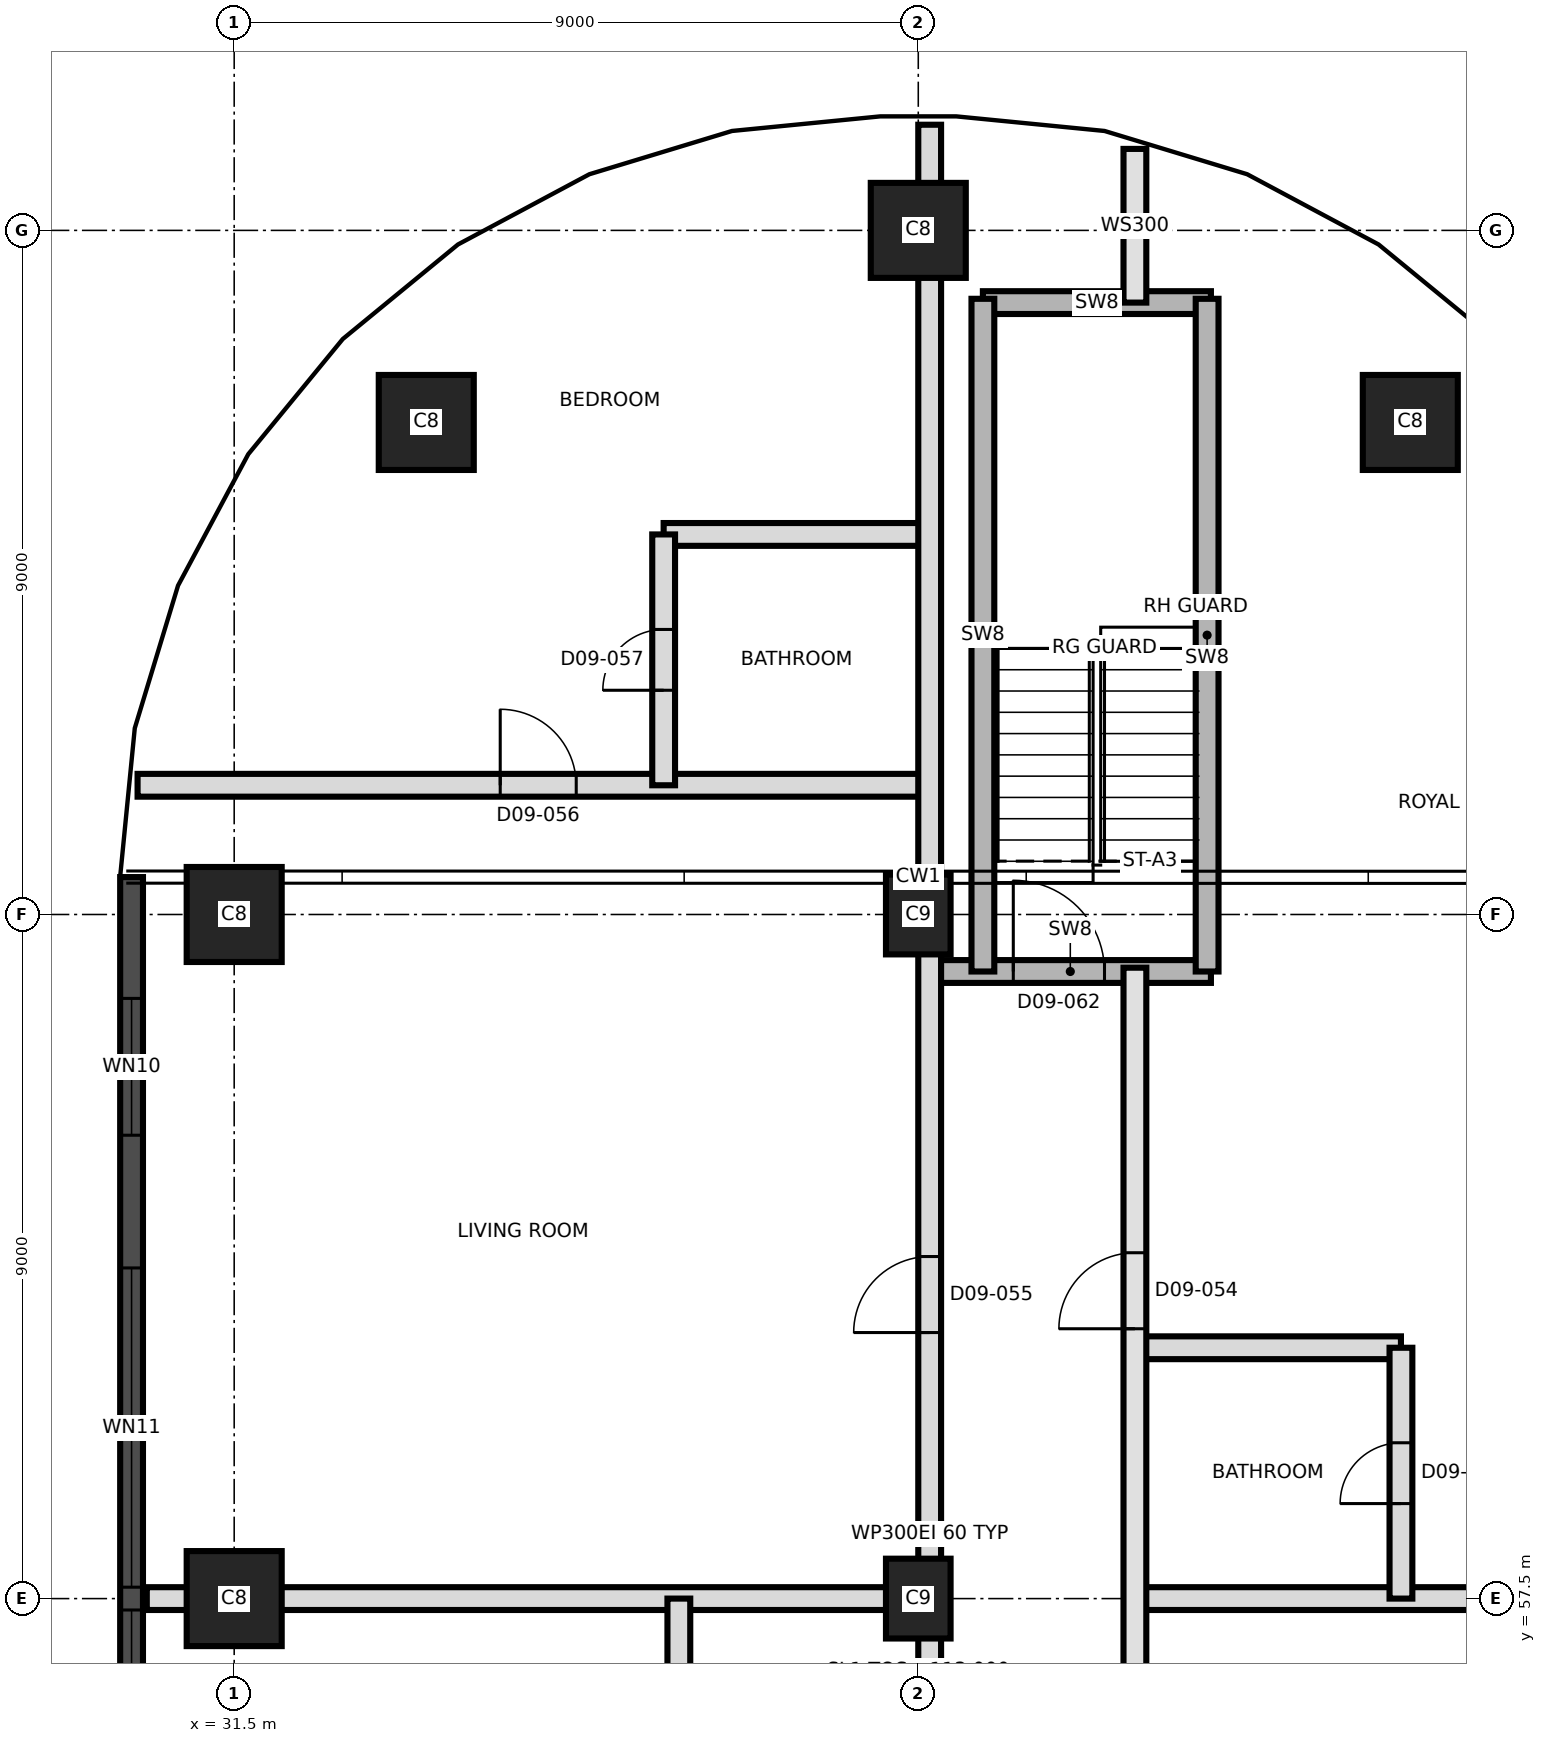
"""IFC4 building model, lengths in metres.
Left out: names, types, materials, properties, quantities, classifications, styles, units other than length and angle.
Written with IfcOpenShell. Run it as: python <this file> out.ifc"""

import sys

from ifc_helpers import new_model, si_unit, direction, frame, frame_2d, origin, origin_2d, place, context, subcontext, project, spatial, rectangle, extrude, element, fill, save


model = new_model("IFC4")
c1 = context("Model", 3, precision=1e-05, world=origin(), true_north=direction((0.0, 1.0)))
c2 = subcontext(c1, "Body", "Model", "MODEL_VIEW")
j1 = project(units=[si_unit("LENGTHUNIT", "METRE"), si_unit("PLANEANGLEUNIT", "RADIAN")], contexts=[c1])
p1 = place(None, origin())
s1 = spatial("IfcSite", under=j1, at=p1, CompositionType="ELEMENT")
p2 = place(p1, origin())
s2 = spatial("IfcBuilding", under=s1, at=p2, CompositionType="ELEMENT")
p3 = place(p2, frame((0.0, 0.0, 113.0)))
s3 = spatial("IfcBuildingStorey", under=s2, at=p3, CompositionType="ELEMENT", Elevation=113.0)
p4 = place(p3, frame((31.5, 57.5, 0.0), z_axis=(0.0, 0.0, 1.0), x_axis=(1.0, 0.0, 0.0)))
e1 = element("IfcColumn", 1, at=p4, inside=s3, PredefinedType="COLUMN", context=c2, shape_type="SweptSolid", body=[
    extrude(rectangle(XDim=1.25, YDim=1.25, at=origin_2d()), origin(), (0.0, 0.0, 1.0), 3.7),
])
p5 = place(p3, frame((40.5, 57.5, 0.0), z_axis=(0.0, 0.0, 1.0), x_axis=(0.0, 1.0, 0.0)))
e2 = element("IfcColumn", 2, at=p5, inside=s3, PredefinedType="COLUMN", context=c2, shape_type="SweptSolid", body=[
    extrude(rectangle(XDim=1.05, YDim=0.85, at=origin_2d()), origin(), (0.0, 0.0, 1.0), 3.7),
])
p6 = place(p3, frame((31.5, 66.5, 0.0), z_axis=(0.0, 0.0, 1.0), x_axis=(1.0, 0.0, 0.0)))
e3 = element("IfcColumn", 3, at=p6, inside=s3, PredefinedType="COLUMN", context=c2, shape_type="SweptSolid", body=[
    extrude(rectangle(XDim=1.25, YDim=1.25, at=origin_2d()), origin(), (0.0, 0.0, 1.0), 3.7),
])
p7 = place(p3, frame((40.5, 66.5, 0.0), z_axis=(0.0, 0.0, 1.0), x_axis=(0.0, 1.0, 0.0)))
e4 = element("IfcColumn", 4, at=p7, inside=s3, PredefinedType="COLUMN", context=c2, shape_type="SweptSolid", body=[
    extrude(rectangle(XDim=1.05, YDim=0.85, at=origin_2d()), origin(), (0.0, 0.0, 1.0), 3.7),
])
for number, where, z_axis, x_axis in (
    (5, (34.027, 72.973, 0.0), (0.0, 0.0, 1.0), (1.0, 0.0, 0.0)),
    (6, (46.973, 72.973, 0.0), (0.0, 0.0, 1.0), (1.0, 0.0, 0.0)),
    (7, (40.5, 75.5, 0.0), (0.0, 0.0, 1.0), (1.0, 0.0, 0.0)),
):
    element("IfcColumn", number, at=place(p3, frame(where, z_axis=z_axis, x_axis=x_axis)), inside=s3, PredefinedType="COLUMN", context=c2, shape_type="SweptSolid", body=[
        extrude(rectangle(XDim=1.25, YDim=1.25, at=origin_2d()), origin(), (0.0, 0.0, 1.0), 3.7),
    ])
p8 = place(p3, frame((30.15, 66.992, 0.0), z_axis=(0.0, 0.0, 1.0), x_axis=(0.0, -1.0, 0.0)))
e8 = element("IfcWall", 8, at=p8, inside=s3, PredefinedType="SOLIDWALL", context=c2, shape_type="SweptSolid", body=[
    extrude(rectangle(XDim=32.968, YDim=0.3, at=frame_2d((16.484, 0.0))), origin(), (0.0, 0.0, 1.0), 3.4),
])
p9 = place(p8, frame((1.596, 0.0, 0.3)))
e9 = element("IfcOpeningElement", 9, at=p9, cuts=e8, PredefinedType="OPENING", context=c2, shape_type="SweptSolid", body=[
    extrude(rectangle(XDim=1.8, YDim=2.4, at=frame_2d((0.9, 1.2))), frame((0.0, 0.16, 0.0), z_axis=(0.0, -1.0, 0.0), x_axis=(1.0, 0.0, 0.0)), (0.0, 0.0, 1.0), 0.32),
])
p10 = place(p8, frame((5.142, 0.0, 0.9)))
e10 = element("IfcOpeningElement", 10, at=p10, cuts=e8, PredefinedType="OPENING", context=c2, shape_type="SweptSolid", body=[
    extrude(rectangle(XDim=4.2, YDim=1.5, at=frame_2d((2.1, 0.75))), frame((0.0, 0.16, 0.0), z_axis=(0.0, -1.0, 0.0), x_axis=(1.0, 0.0, 0.0)), (0.0, 0.0, 1.0), 0.32),
])
p11 = place(p8, frame((9.642, 0.0, 0.9)))
e11 = element("IfcOpeningElement", 11, at=p11, cuts=e8, PredefinedType="OPENING", context=c2, shape_type="SweptSolid", body=[
    extrude(rectangle(XDim=4.2, YDim=1.5, at=frame_2d((2.1, 0.75))), frame((0.0, 0.16, 0.0), z_axis=(0.0, -1.0, 0.0), x_axis=(1.0, 0.0, 0.0)), (0.0, 0.0, 1.0), 0.32),
])
p12 = place(p8, frame((14.142, 0.0, 0.9)))
e12 = element("IfcOpeningElement", 12, at=p12, cuts=e8, PredefinedType="OPENING", context=c2, shape_type="SweptSolid", body=[
    extrude(rectangle(XDim=4.2, YDim=1.5, at=frame_2d((2.1, 0.75))), frame((0.0, 0.16, 0.0), z_axis=(0.0, -1.0, 0.0), x_axis=(1.0, 0.0, 0.0)), (0.0, 0.0, 1.0), 0.32),
])
p13 = place(p8, frame((18.642, 0.0, 0.9)))
e13 = element("IfcOpeningElement", 13, at=p13, cuts=e8, PredefinedType="OPENING", context=c2, shape_type="SweptSolid", body=[
    extrude(rectangle(XDim=4.2, YDim=1.5, at=frame_2d((2.1, 0.75))), frame((0.0, 0.16, 0.0), z_axis=(0.0, -1.0, 0.0), x_axis=(1.0, 0.0, 0.0)), (0.0, 0.0, 1.0), 0.32),
])
p14 = place(p8, frame((23.142, 0.0, 0.9)))
e14 = element("IfcOpeningElement", 14, at=p14, cuts=e8, PredefinedType="OPENING", context=c2, shape_type="SweptSolid", body=[
    extrude(rectangle(XDim=4.2, YDim=1.5, at=frame_2d((2.1, 0.75))), frame((0.0, 0.16, 0.0), z_axis=(0.0, -1.0, 0.0), x_axis=(1.0, 0.0, 0.0)), (0.0, 0.0, 1.0), 0.32),
])
p15 = place(p8, frame((29.33, 0.0, 0.3)))
e15 = element("IfcOpeningElement", 15, at=p15, cuts=e8, PredefinedType="OPENING", context=c2, shape_type="SweptSolid", body=[
    extrude(rectangle(XDim=1.8, YDim=2.4, at=frame_2d((0.9, 1.2))), frame((0.0, 0.16, 0.0), z_axis=(0.0, -1.0, 0.0), x_axis=(1.0, 0.0, 0.0)), (0.0, 0.0, 1.0), 0.32),
])
p16 = place(p3, frame((30.35, 57.5, 0.0), z_axis=(0.0, 0.0, 1.0), x_axis=(1.0, 0.0, 0.0)))
e16 = element("IfcWall", 16, at=p16, inside=s3, PredefinedType="PARTITIONING", context=c2, shape_type="SweptSolid", body=[
    extrude(rectangle(XDim=10.3, YDim=0.3, at=frame_2d((5.15, 0.0))), origin(), (0.0, 0.0, 1.0), 3.4),
])
p17 = place(p3, frame((43.35, 57.5, 0.0), z_axis=(0.0, 0.0, 1.0), x_axis=(1.0, 0.0, 0.0)))
e17 = element("IfcWall", 17, at=p17, inside=s3, PredefinedType="PARTITIONING", context=c2, shape_type="SweptSolid", body=[
    extrude(rectangle(XDim=7.48, YDim=0.3, at=frame_2d((3.74, 0.0))), origin(), (0.0, 0.0, 1.0), 3.4),
])
p18 = place(p3, frame((43.35, 60.8, 0.0), z_axis=(0.0, 0.0, 1.0), x_axis=(1.0, 0.0, 0.0)))
e18 = element("IfcWall", 18, at=p18, inside=s3, PredefinedType="PARTITIONING", context=c2, shape_type="SweptSolid", body=[
    extrude(rectangle(XDim=3.5, YDim=0.3, at=frame_2d((1.75, 0.0))), origin(), (0.0, 0.0, 1.0), 3.4),
])
p19 = place(p3, frame((40.65, 65.75, 0.0), z_axis=(0.0, 0.0, 1.0), x_axis=(1.0, 0.0, 0.0)))
e19 = element("IfcWall", 19, at=p19, inside=s3, PredefinedType="SHEAR", context=c2, shape_type="SweptSolid", body=[
    extrude(rectangle(XDim=3.7, YDim=0.3, at=frame_2d((1.85, 0.0))), origin(), (0.0, 0.0, 1.0), 3.4),
])
p20 = place(p19, frame((1.1, 0.0, 0.0)))
e20 = element("IfcOpeningElement", 20, at=p20, cuts=e19, PredefinedType="OPENING", context=c2, shape_type="SweptSolid", body=[
    extrude(rectangle(XDim=1.2, YDim=2.1, at=frame_2d((0.6, 1.05))), frame((0.0, 0.16, 0.0), z_axis=(0.0, -1.0, 0.0), x_axis=(1.0, 0.0, 0.0)), (0.0, 0.0, 1.0), 0.32),
])
p21 = place(p3, frame((30.229, 68.2, 0.0), z_axis=(0.0, 0.0, 1.0), x_axis=(1.0, 0.0, 0.0)))
e21 = element("IfcWall", 21, at=p21, inside=s3, PredefinedType="PARTITIONING", context=c2, shape_type="SweptSolid", body=[
    extrude(rectangle(XDim=10.421, YDim=0.3, at=frame_2d((5.21, 0.0))), origin(), (0.0, 0.0, 1.0), 3.4),
])
p22 = place(p21, frame((4.771, 0.0, 0.0)))
e22 = element("IfcOpeningElement", 22, at=p22, cuts=e21, PredefinedType="OPENING", context=c2, shape_type="SweptSolid", body=[
    extrude(rectangle(XDim=1.0, YDim=2.1, at=frame_2d((0.5, 1.05))), frame((0.0, 0.16, 0.0), z_axis=(0.0, -1.0, 0.0), x_axis=(1.0, 0.0, 0.0)), (0.0, 0.0, 1.0), 0.32),
])
p23 = place(p3, frame((37.15, 71.5, 0.0), z_axis=(0.0, 0.0, 1.0), x_axis=(1.0, 0.0, 0.0)))
e23 = element("IfcWall", 23, at=p23, inside=s3, PredefinedType="PARTITIONING", context=c2, shape_type="SweptSolid", body=[
    extrude(rectangle(XDim=3.5, YDim=0.3, at=frame_2d((1.75, 0.0))), origin(), (0.0, 0.0, 1.0), 3.4),
])
p24 = place(p3, frame((41.35, 74.55, 0.0), z_axis=(0.0, 0.0, 1.0), x_axis=(1.0, 0.0, 0.0)))
e24 = element("IfcWall", 24, at=p24, inside=s3, PredefinedType="SHEAR", context=c2, shape_type="SweptSolid", body=[
    extrude(rectangle(XDim=3.0, YDim=0.3, at=frame_2d((1.5, 0.0))), origin(), (0.0, 0.0, 1.0), 3.4),
])
p25 = place(p3, frame((37.15, 68.2, 0.0), z_axis=(0.0, 0.0, 1.0), x_axis=(0.0, 1.0, 0.0)))
e25 = element("IfcWall", 25, at=p25, inside=s3, PredefinedType="PARTITIONING", context=c2, shape_type="SweptSolid", body=[
    extrude(rectangle(XDim=3.3, YDim=0.3, at=frame_2d((1.65, 0.0))), origin(), (0.0, 0.0, 1.0), 3.4),
])
p26 = place(p25, frame((1.25, 0.0, 0.0)))
e26 = element("IfcOpeningElement", 26, at=p26, cuts=e25, PredefinedType="OPENING", context=c2, shape_type="SweptSolid", body=[
    extrude(rectangle(XDim=0.8, YDim=2.1, at=frame_2d((0.4, 1.05))), frame((0.0, 0.16, 0.0), z_axis=(0.0, -1.0, 0.0), x_axis=(1.0, 0.0, 0.0)), (0.0, 0.0, 1.0), 0.32),
])
p27 = place(p3, frame((37.35, 54.5, 0.0), z_axis=(0.0, 0.0, 1.0), x_axis=(0.0, 1.0, 0.0)))
e27 = element("IfcWall", 27, at=p27, inside=s3, PredefinedType="PARTITIONING", context=c2, shape_type="SweptSolid", body=[
    extrude(rectangle(XDim=3.0, YDim=0.3, at=frame_2d((1.5, 0.0))), origin(), (0.0, 0.0, 1.0), 3.4),
])
p28 = place(p27, frame((1.1, 0.0, 0.0)))
e28 = element("IfcOpeningElement", 28, at=p28, cuts=e27, PredefinedType="OPENING", context=c2, shape_type="SweptSolid", body=[
    extrude(rectangle(XDim=0.8, YDim=2.1, at=frame_2d((0.4, 1.05))), frame((0.0, 0.16, 0.0), z_axis=(0.0, -1.0, 0.0), x_axis=(1.0, 0.0, 0.0)), (0.0, 0.0, 1.0), 0.32),
])
p29 = place(p3, frame((40.65, 39.8, 0.0), z_axis=(0.0, 0.0, 1.0), x_axis=(0.0, 1.0, 0.0)))
e29 = element("IfcWall", 29, at=p29, inside=s3, PredefinedType="PARTITIONING", context=c2, shape_type="SweptSolid", body=[
    extrude(rectangle(XDim=37.09, YDim=0.3, at=frame_2d((18.545, 0.0))), origin(), (0.0, 0.0, 1.0), 3.4),
])
p30 = place(p29, frame((0.835, 0.0, 0.0)))
e30 = element("IfcOpeningElement", 30, at=p30, cuts=e29, PredefinedType="OPENING", context=c2, shape_type="SweptSolid", body=[
    extrude(rectangle(XDim=1.2, YDim=2.1, at=frame_2d((0.6, 1.05))), frame((0.0, 0.16, 0.0), z_axis=(0.0, -1.0, 0.0), x_axis=(1.0, 0.0, 0.0)), (0.0, 0.0, 1.0), 0.32),
])
p31 = place(p29, frame((4.085, 0.0, 0.0)))
e31 = element("IfcOpeningElement", 31, at=p31, cuts=e29, PredefinedType="OPENING", context=c2, shape_type="SweptSolid", body=[
    extrude(rectangle(XDim=1.0, YDim=2.1, at=frame_2d((0.5, 1.05))), frame((0.0, 0.16, 0.0), z_axis=(0.0, -1.0, 0.0), x_axis=(1.0, 0.0, 0.0)), (0.0, 0.0, 1.0), 0.32),
])
p32 = place(p29, frame((11.62, 0.0, 0.0)))
e32 = element("IfcOpeningElement", 32, at=p32, cuts=e29, PredefinedType="OPENING", context=c2, shape_type="SweptSolid", body=[
    extrude(rectangle(XDim=1.0, YDim=2.4, at=frame_2d((0.5, 1.2))), frame((0.0, 0.16, 0.0), z_axis=(0.0, -1.0, 0.0), x_axis=(1.0, 0.0, 0.0)), (0.0, 0.0, 1.0), 0.32),
])
p33 = place(p29, frame((13.27, 0.0, 0.0)))
e33 = element("IfcOpeningElement", 33, at=p33, cuts=e29, PredefinedType="OPENING", context=c2, shape_type="SweptSolid", body=[
    extrude(rectangle(XDim=1.0, YDim=2.4, at=frame_2d((0.5, 1.2))), frame((0.0, 0.16, 0.0), z_axis=(0.0, -1.0, 0.0), x_axis=(1.0, 0.0, 0.0)), (0.0, 0.0, 1.0), 0.32),
])
p34 = place(p29, frame((21.2, 0.0, 0.0)))
e34 = element("IfcOpeningElement", 34, at=p34, cuts=e29, PredefinedType="OPENING", context=c2, shape_type="SweptSolid", body=[
    extrude(rectangle(XDim=1.0, YDim=2.4, at=frame_2d((0.5, 1.2))), frame((0.0, 0.16, 0.0), z_axis=(0.0, -1.0, 0.0), x_axis=(1.0, 0.0, 0.0)), (0.0, 0.0, 1.0), 0.32),
])
p35 = place(p3, frame((41.35, 65.75, 0.0), z_axis=(0.0, 0.0, 1.0), x_axis=(0.0, 1.0, 0.0)))
e35 = element("IfcWall", 35, at=p35, inside=s3, PredefinedType="SHEAR", context=c2, shape_type="SweptSolid", body=[
    extrude(rectangle(XDim=8.85, YDim=0.3, at=frame_2d((4.425, 0.0))), origin(), (0.0, 0.0, 1.0), 3.4),
])
p36 = place(p3, frame((43.35, 39.8, 0.0), z_axis=(0.0, 0.0, 1.0), x_axis=(0.0, 1.0, 0.0)))
e36 = element("IfcWall", 36, at=p36, inside=s3, PredefinedType="SOLIDWALL", context=c2, shape_type="SweptSolid", body=[
    extrude(rectangle(XDim=26.0, YDim=0.3, at=frame_2d((13.0, 0.0))), origin(), (0.0, 0.0, 1.0), 3.4),
])
p37 = place(p36, frame((2.05, 0.0, 0.0)))
e37 = element("IfcOpeningElement", 37, at=p37, cuts=e36, PredefinedType="OPENING", context=c2, shape_type="SweptSolid", body=[
    extrude(rectangle(XDim=1.0, YDim=2.4, at=frame_2d((0.5, 1.2))), frame((0.0, 0.16, 0.0), z_axis=(0.0, -1.0, 0.0), x_axis=(1.0, 0.0, 0.0)), (0.0, 0.0, 1.0), 0.32),
])
p38 = place(p36, frame((14.35, 0.0, 0.0)))
e38 = element("IfcOpeningElement", 38, at=p38, cuts=e36, PredefinedType="OPENING", context=c2, shape_type="SweptSolid", body=[
    extrude(rectangle(XDim=1.0, YDim=2.4, at=frame_2d((0.5, 1.2))), frame((0.0, 0.16, 0.0), z_axis=(0.0, -1.0, 0.0), x_axis=(1.0, 0.0, 0.0)), (0.0, 0.0, 1.0), 0.32),
])
p39 = place(p36, frame((21.25, 0.0, 0.0)))
e39 = element("IfcOpeningElement", 39, at=p39, cuts=e36, PredefinedType="OPENING", context=c2, shape_type="SweptSolid", body=[
    extrude(rectangle(XDim=1.0, YDim=2.4, at=frame_2d((0.5, 1.2))), frame((0.0, 0.16, 0.0), z_axis=(0.0, -1.0, 0.0), x_axis=(1.0, 0.0, 0.0)), (0.0, 0.0, 1.0), 0.32),
])
p40 = place(p3, frame((43.35, 74.55, 0.0), z_axis=(0.0, 0.0, 1.0), x_axis=(0.0, 1.0, 0.0)))
e40 = element("IfcWall", 40, at=p40, inside=s3, PredefinedType="SOLIDWALL", context=c2, shape_type="SweptSolid", body=[
    extrude(rectangle(XDim=2.022, YDim=0.3, at=frame_2d((1.011, 0.0))), origin(), (0.0, 0.0, 1.0), 3.4),
])
p41 = place(p3, frame((44.3, 65.75, 0.0), z_axis=(0.0, 0.0, 1.0), x_axis=(0.0, 1.0, 0.0)))
e41 = element("IfcWall", 41, at=p41, inside=s3, PredefinedType="SHEAR", context=c2, shape_type="SweptSolid", body=[
    extrude(rectangle(XDim=8.85, YDim=0.3, at=frame_2d((4.425, 0.0))), origin(), (0.0, 0.0, 1.0), 3.4),
])
p42 = place(p3, frame((46.85, 57.5, 0.0), z_axis=(0.0, 0.0, 1.0), x_axis=(0.0, 1.0, 0.0)))
e42 = element("IfcWall", 42, at=p42, inside=s3, PredefinedType="PARTITIONING", context=c2, shape_type="SweptSolid", body=[
    extrude(rectangle(XDim=3.3, YDim=0.3, at=frame_2d((1.65, 0.0))), origin(), (0.0, 0.0, 1.0), 3.4),
])
p43 = place(p42, frame((1.25, 0.0, 0.0)))
e43 = element("IfcOpeningElement", 43, at=p43, cuts=e42, PredefinedType="OPENING", context=c2, shape_type="SweptSolid", body=[
    extrude(rectangle(XDim=0.8, YDim=2.1, at=frame_2d((0.4, 1.05))), frame((0.0, 0.16, 0.0), z_axis=(0.0, -1.0, 0.0), x_axis=(1.0, 0.0, 0.0)), (0.0, 0.0, 1.0), 0.32),
])
p44 = place(p9, origin())
e44 = element("IfcWindow", 44, at=p44, inside=s3, PartitioningType="SINGLE_PANEL", PredefinedType="WINDOW", context=c2, shape_type="SweptSolid", body=[
    extrude(rectangle(XDim=1.8, YDim=2.4, at=frame_2d((0.9, 1.2))), frame((0.0, 0.03, 0.0), z_axis=(0.0, -1.0, 0.0), x_axis=(1.0, 0.0, 0.0)), (0.0, 0.0, 1.0), 0.06),
])
fill(e9, e44)
p45 = place(p10, origin())
e45 = element("IfcWindow", 45, at=p45, inside=s3, PartitioningType="SINGLE_PANEL", PredefinedType="WINDOW", context=c2, shape_type="SweptSolid", body=[
    extrude(rectangle(XDim=4.2, YDim=1.5, at=frame_2d((2.1, 0.75))), frame((0.0, 0.03, 0.0), z_axis=(0.0, -1.0, 0.0), x_axis=(1.0, 0.0, 0.0)), (0.0, 0.0, 1.0), 0.06),
])
fill(e10, e45)
p46 = place(p11, origin())
e46 = element("IfcWindow", 46, at=p46, inside=s3, PartitioningType="SINGLE_PANEL", PredefinedType="WINDOW", context=c2, shape_type="SweptSolid", body=[
    extrude(rectangle(XDim=4.2, YDim=1.5, at=frame_2d((2.1, 0.75))), frame((0.0, 0.03, 0.0), z_axis=(0.0, -1.0, 0.0), x_axis=(1.0, 0.0, 0.0)), (0.0, 0.0, 1.0), 0.06),
])
fill(e11, e46)
p47 = place(p43, origin())
e47 = element("IfcDoor", 47, at=p47, inside=s3, OperationType="SINGLE_SWING_LEFT", PredefinedType="DOOR", context=c2, shape_type="SweptSolid", body=[
    extrude(rectangle(XDim=0.8, YDim=2.1, at=frame_2d((0.4, 1.05))), frame((0.0, 0.025, 0.0), z_axis=(0.0, -1.0, 0.0), x_axis=(1.0, 0.0, 0.0)), (0.0, 0.0, 1.0), 0.05),
])
fill(e43, e47)
p48 = place(p39, origin())
e48 = element("IfcDoor", 48, at=p48, inside=s3, OperationType="SINGLE_SWING_RIGHT", PredefinedType="DOOR", context=c2, shape_type="SweptSolid", body=[
    extrude(rectangle(XDim=1.0, YDim=2.4, at=frame_2d((0.5, 1.2))), frame((0.0, 0.025, 0.0), z_axis=(0.0, -1.0, 0.0), x_axis=(1.0, 0.0, 0.0)), (0.0, 0.0, 1.0), 0.05),
])
fill(e39, e48)
p49 = place(p34, origin())
e49 = element("IfcDoor", 49, at=p49, inside=s3, OperationType="SINGLE_SWING_LEFT", PredefinedType="DOOR", context=c2, shape_type="SweptSolid", body=[
    extrude(rectangle(XDim=1.0, YDim=2.4, at=frame_2d((0.5, 1.2))), frame((0.0, 0.025, 0.0), z_axis=(0.0, -1.0, 0.0), x_axis=(1.0, 0.0, 0.0)), (0.0, 0.0, 1.0), 0.05),
])
fill(e34, e49)
p50 = place(p22, origin())
e50 = element("IfcDoor", 50, at=p50, inside=s3, OperationType="SINGLE_SWING_RIGHT", PredefinedType="DOOR", context=c2, shape_type="SweptSolid", body=[
    extrude(rectangle(XDim=1.0, YDim=2.1, at=frame_2d((0.5, 1.05))), frame((0.0, 0.025, 0.0), z_axis=(0.0, -1.0, 0.0), x_axis=(1.0, 0.0, 0.0)), (0.0, 0.0, 1.0), 0.05),
])
fill(e22, e50)
p51 = place(p26, origin())
e51 = element("IfcDoor", 51, at=p51, inside=s3, OperationType="SINGLE_SWING_LEFT", PredefinedType="DOOR", context=c2, shape_type="SweptSolid", body=[
    extrude(rectangle(XDim=0.8, YDim=2.1, at=frame_2d((0.4, 1.05))), frame((0.0, 0.025, 0.0), z_axis=(0.0, -1.0, 0.0), x_axis=(1.0, 0.0, 0.0)), (0.0, 0.0, 1.0), 0.05),
])
fill(e26, e51)
p52 = place(p20, origin())
e52 = element("IfcDoor", 52, at=p52, inside=s3, OperationType="SINGLE_SWING_RIGHT", PredefinedType="DOOR", context=c2, shape_type="SweptSolid", body=[
    extrude(rectangle(XDim=1.2, YDim=2.1, at=frame_2d((0.6, 1.05))), frame((0.0, 0.025, 0.0), z_axis=(0.0, -1.0, 0.0), x_axis=(1.0, 0.0, 0.0)), (0.0, 0.0, 1.0), 0.05),
])
fill(e20, e52)
save(model, sys.argv[1])
